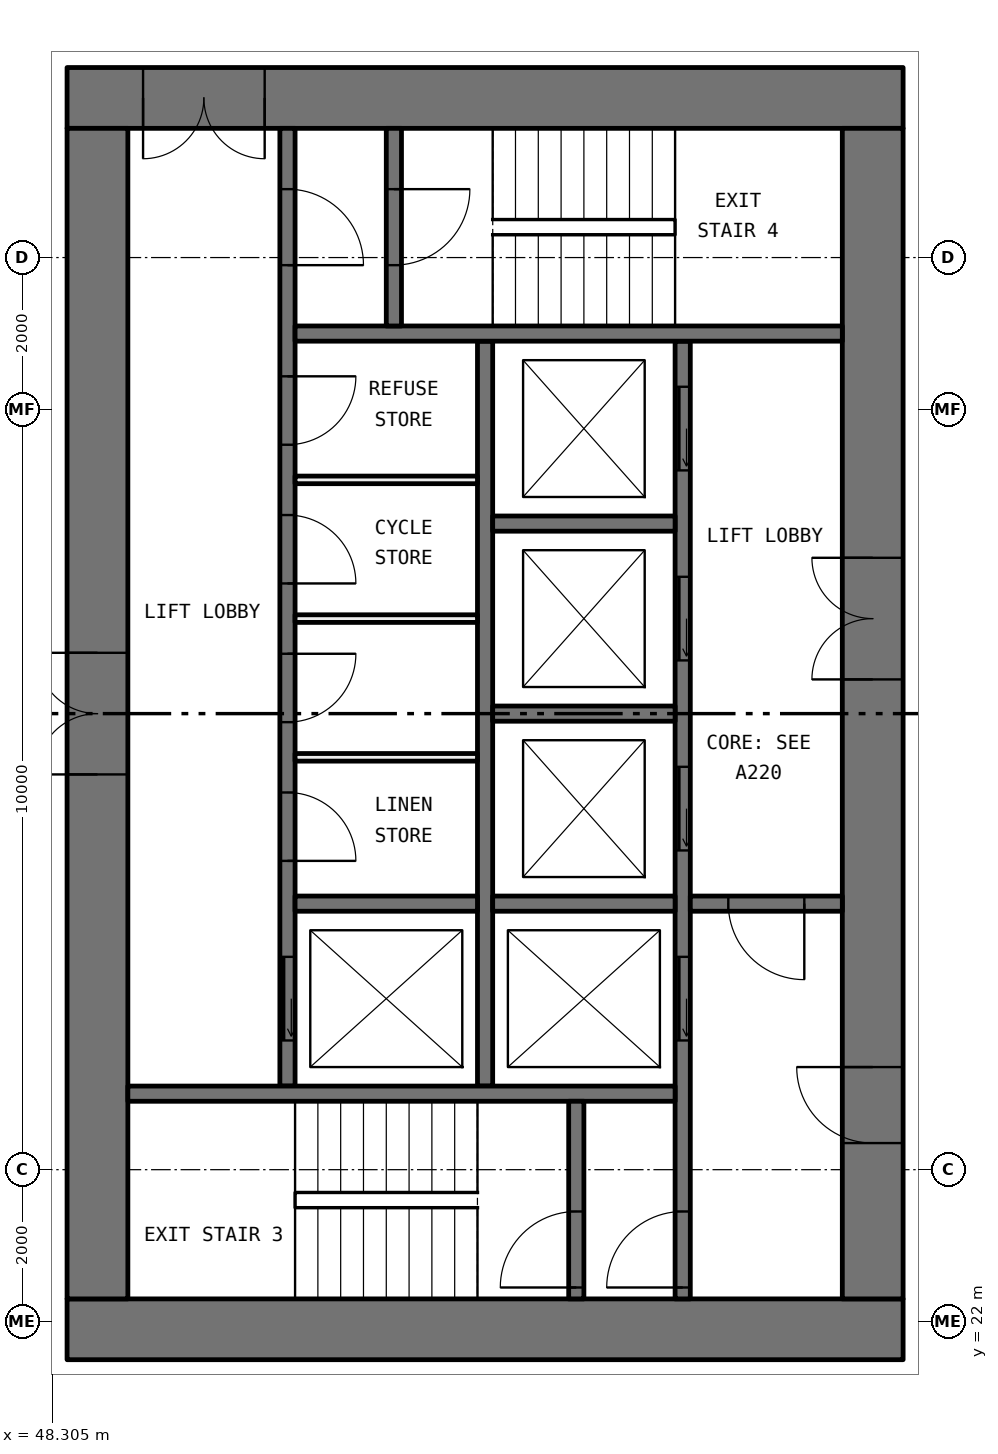
"""IFC4 building model, lengths in metres.
Left out: names, types, materials, properties, quantities, classifications, styles, units other than length and angle.
Written with IfcOpenShell. Run it as: python <this file> out.ifc"""

import sys

from ifc_helpers import new_model, si_unit, direction, frame, frame_2d, origin, place, context, subcontext, project, spatial, rectangle, extrude, element, fill, save


model = new_model("IFC4")
c1 = context("Model", 3, precision=1e-05, world=origin(), true_north=direction((0.0, 1.0)))
c2 = subcontext(c1, "Body", "Model", "MODEL_VIEW")
j1 = project(units=[si_unit("LENGTHUNIT", "METRE"), si_unit("PLANEANGLEUNIT", "RADIAN")], contexts=[c1])
p1 = place(None, origin())
s1 = spatial("IfcSite", under=j1, at=p1, CompositionType="ELEMENT")
p2 = place(p1, origin())
s2 = spatial("IfcBuilding", under=s1, at=p2, CompositionType="ELEMENT")
p3 = place(p2, frame((0.0, 0.0, 78.3)))
s3 = spatial("IfcBuildingStorey", under=s2, at=p3, CompositionType="ELEMENT", Elevation=78.3)
p4 = place(p3, frame((59.5, 21.9, 0.0), z_axis=(0.0, 0.0, 1.0), x_axis=(-1.0, 0.0, 0.0)))
e1 = element("IfcWall", 1, at=p4, inside=s3, PredefinedType="SHEAR", context=c2, shape_type="SweptSolid", body=[
    extrude(rectangle(XDim=11.0, YDim=0.8, at=frame_2d((5.5, 0.0))), origin(), (0.0, 0.0, 1.0), 3.05),
])
p5 = place(p3, frame((59.5, 38.1, 0.0), z_axis=(0.0, 0.0, 1.0), x_axis=(-1.0, 0.0, 0.0)))
e2 = element("IfcWall", 2, at=p5, inside=s3, PredefinedType="SHEAR", context=c2, shape_type="SweptSolid", body=[
    extrude(rectangle(XDim=11.0, YDim=0.8, at=frame_2d((5.5, 0.0))), origin(), (0.0, 0.0, 1.0), 3.05),
])
p6 = place(p5, frame((8.4, 0.0, 0.0)))
e3 = element("IfcOpeningElement", 3, at=p6, cuts=e2, PredefinedType="OPENING", context=c2, shape_type="SweptSolid", body=[
    extrude(rectangle(XDim=1.6, YDim=2.1, at=frame_2d((0.8, 1.05))), frame((0.0, 0.41, 0.0), z_axis=(0.0, -1.0, 0.0), x_axis=(1.0, 0.0, 0.0)), (0.0, 0.0, 1.0), 0.82),
])
p7 = place(p3, frame((59.1, 22.3, 0.0), z_axis=(0.0, 0.0, 1.0), x_axis=(0.0, 1.0, 0.0)))
e4 = element("IfcWall", 4, at=p7, inside=s3, PredefinedType="SHEAR", context=c2, shape_type="SweptSolid", body=[
    extrude(rectangle(XDim=15.4, YDim=0.8, at=frame_2d((7.7, 0.0))), origin(), (0.0, 0.0, 1.0), 3.05),
])
p8 = place(p7, frame((8.15, 0.0, 0.0)))
e5 = element("IfcOpeningElement", 5, at=p8, cuts=e4, PredefinedType="OPENING", context=c2, shape_type="SweptSolid", body=[
    extrude(rectangle(XDim=1.6, YDim=2.1, at=frame_2d((0.8, 1.05))), frame((0.0, 0.41, 0.0), z_axis=(0.0, -1.0, 0.0), x_axis=(1.0, 0.0, 0.0)), (0.0, 0.0, 1.0), 0.82),
])
p9 = place(p7, frame((2.05, 0.0, 0.0)))
e6 = element("IfcOpeningElement", 6, at=p9, cuts=e4, PredefinedType="OPENING", context=c2, shape_type="SweptSolid", body=[
    extrude(rectangle(XDim=1.0, YDim=2.1, at=frame_2d((0.5, 1.05))), frame((0.0, 0.41, 0.0), z_axis=(0.0, -1.0, 0.0), x_axis=(1.0, 0.0, 0.0)), (0.0, 0.0, 1.0), 0.82),
])
p10 = place(p3, frame((48.9, 22.3, 0.0), z_axis=(0.0, 0.0, 1.0), x_axis=(0.0, 1.0, 0.0)))
e7 = element("IfcWall", 7, at=p10, inside=s3, PredefinedType="SHEAR", context=c2, shape_type="SweptSolid", body=[
    extrude(rectangle(XDim=15.4, YDim=0.8, at=frame_2d((7.7, 0.0))), origin(), (0.0, 0.0, 1.0), 3.05),
])
p11 = place(p10, frame((6.9, 0.0, 0.0)))
e8 = element("IfcOpeningElement", 8, at=p11, cuts=e7, PredefinedType="OPENING", context=c2, shape_type="SweptSolid", body=[
    extrude(rectangle(XDim=1.6, YDim=2.1, at=frame_2d((0.8, 1.05))), frame((0.0, 0.41, 0.0), z_axis=(0.0, -1.0, 0.0), x_axis=(1.0, 0.0, 0.0)), (0.0, 0.0, 1.0), 0.82),
])
p12 = place(p3, frame((56.6, 22.3, 0.0), z_axis=(0.0, 0.0, 1.0), x_axis=(0.0, 1.0, 0.0)))
e9 = element("IfcWall", 9, at=p12, inside=s3, PredefinedType="SOLIDWALL", context=c2, shape_type="SweptSolid", body=[
    extrude(rectangle(XDim=12.6, YDim=0.2, at=frame_2d((6.3, 0.0))), origin(), (0.0, 0.0, 1.0), 3.05),
])
p13 = place(p12, frame((3.4, 0.0, 0.0)))
e10 = element("IfcOpeningElement", 10, at=p13, cuts=e9, PredefinedType="OPENING", context=c2, shape_type="SweptSolid", body=[
    extrude(rectangle(XDim=1.1, YDim=2.1, at=frame_2d((0.55, 1.05))), frame((0.0, 0.11, 0.0), z_axis=(0.0, -1.0, 0.0), x_axis=(1.0, 0.0, 0.0)), (0.0, 0.0, 1.0), 0.22),
])
p14 = place(p12, frame((5.9, 0.0, 0.0)))
e11 = element("IfcOpeningElement", 11, at=p14, cuts=e9, PredefinedType="OPENING", context=c2, shape_type="SweptSolid", body=[
    extrude(rectangle(XDim=1.1, YDim=2.1, at=frame_2d((0.55, 1.05))), frame((0.0, 0.11, 0.0), z_axis=(0.0, -1.0, 0.0), x_axis=(1.0, 0.0, 0.0)), (0.0, 0.0, 1.0), 0.22),
])
p15 = place(p12, frame((8.4, 0.0, 0.0)))
e12 = element("IfcOpeningElement", 12, at=p15, cuts=e9, PredefinedType="OPENING", context=c2, shape_type="SweptSolid", body=[
    extrude(rectangle(XDim=1.1, YDim=2.1, at=frame_2d((0.55, 1.05))), frame((0.0, 0.11, 0.0), z_axis=(0.0, -1.0, 0.0), x_axis=(1.0, 0.0, 0.0)), (0.0, 0.0, 1.0), 0.22),
])
p16 = place(p12, frame((10.9, 0.0, 0.0)))
e13 = element("IfcOpeningElement", 13, at=p16, cuts=e9, PredefinedType="OPENING", context=c2, shape_type="SweptSolid", body=[
    extrude(rectangle(XDim=1.1, YDim=2.1, at=frame_2d((0.55, 1.05))), frame((0.0, 0.11, 0.0), z_axis=(0.0, -1.0, 0.0), x_axis=(1.0, 0.0, 0.0)), (0.0, 0.0, 1.0), 0.22),
])
p17 = place(p12, frame((0.15, 0.0, 0.0)))
e14 = element("IfcOpeningElement", 14, at=p17, cuts=e9, PredefinedType="OPENING", context=c2, shape_type="SweptSolid", body=[
    extrude(rectangle(XDim=1.0, YDim=2.1, at=frame_2d((0.5, 1.05))), frame((0.0, 0.11, 0.0), z_axis=(0.0, -1.0, 0.0), x_axis=(1.0, 0.0, 0.0)), (0.0, 0.0, 1.0), 0.22),
])
p18 = place(p3, frame((51.4, 25.1, 0.0), z_axis=(0.0, 0.0, 1.0), x_axis=(0.0, 1.0, 0.0)))
e15 = element("IfcWall", 15, at=p18, inside=s3, PredefinedType="SOLIDWALL", context=c2, shape_type="SweptSolid", body=[
    extrude(rectangle(XDim=12.6, YDim=0.2, at=frame_2d((6.3, 0.0))), origin(), (0.0, 0.0, 1.0), 3.05),
])
p19 = place(p18, frame((0.6, 0.0, 0.0)))
e16 = element("IfcOpeningElement", 16, at=p19, cuts=e15, PredefinedType="OPENING", context=c2, shape_type="SweptSolid", body=[
    extrude(rectangle(XDim=1.1, YDim=2.1, at=frame_2d((0.55, 1.05))), frame((0.0, 0.11, 0.0), z_axis=(0.0, -1.0, 0.0), x_axis=(1.0, 0.0, 0.0)), (0.0, 0.0, 1.0), 0.22),
])
p20 = place(p18, frame((10.8, 0.0, 0.0)))
e17 = element("IfcOpeningElement", 17, at=p20, cuts=e15, PredefinedType="OPENING", context=c2, shape_type="SweptSolid", body=[
    extrude(rectangle(XDim=1.0, YDim=2.1, at=frame_2d((0.5, 1.05))), frame((0.0, 0.11, 0.0), z_axis=(0.0, -1.0, 0.0), x_axis=(1.0, 0.0, 0.0)), (0.0, 0.0, 1.0), 0.22),
])
p21 = place(p18, frame((2.962, 0.0, 0.0)))
e18 = element("IfcOpeningElement", 18, at=p21, cuts=e15, PredefinedType="OPENING", context=c2, shape_type="SweptSolid", body=[
    extrude(rectangle(XDim=0.9, YDim=2.1, at=frame_2d((0.45, 1.05))), frame((0.0, 0.11, 0.0), z_axis=(0.0, -1.0, 0.0), x_axis=(1.0, 0.0, 0.0)), (0.0, 0.0, 1.0), 0.22),
])
p22 = place(p18, frame((4.788, 0.0, 0.0)))
e19 = element("IfcOpeningElement", 19, at=p22, cuts=e15, PredefinedType="OPENING", context=c2, shape_type="SweptSolid", body=[
    extrude(rectangle(XDim=0.9, YDim=2.1, at=frame_2d((0.45, 1.05))), frame((0.0, 0.11, 0.0), z_axis=(0.0, -1.0, 0.0), x_axis=(1.0, 0.0, 0.0)), (0.0, 0.0, 1.0), 0.22),
])
p23 = place(p18, frame((6.613, 0.0, 0.0)))
e20 = element("IfcOpeningElement", 20, at=p23, cuts=e15, PredefinedType="OPENING", context=c2, shape_type="SweptSolid", body=[
    extrude(rectangle(XDim=0.9, YDim=2.1, at=frame_2d((0.45, 1.05))), frame((0.0, 0.11, 0.0), z_axis=(0.0, -1.0, 0.0), x_axis=(1.0, 0.0, 0.0)), (0.0, 0.0, 1.0), 0.22),
])
p24 = place(p18, frame((8.438, 0.0, 0.0)))
e21 = element("IfcOpeningElement", 21, at=p24, cuts=e15, PredefinedType="OPENING", context=c2, shape_type="SweptSolid", body=[
    extrude(rectangle(XDim=0.9, YDim=2.1, at=frame_2d((0.45, 1.05))), frame((0.0, 0.11, 0.0), z_axis=(0.0, -1.0, 0.0), x_axis=(1.0, 0.0, 0.0)), (0.0, 0.0, 1.0), 0.22),
])
p25 = place(p3, frame((54.0, 25.1, 0.0), z_axis=(0.0, 0.0, 1.0), x_axis=(0.0, 1.0, 0.0)))
e22 = element("IfcWall", 22, at=p25, inside=s3, PredefinedType="SOLIDWALL", context=c2, shape_type="SweptSolid", body=[
    extrude(rectangle(XDim=9.8, YDim=0.2, at=frame_2d((4.9, 0.0))), origin(), (0.0, 0.0, 1.0), 3.05),
])
for number, where, z_axis, x_axis in (
    (23, (56.5, 25.0, 0.0), (0.0, 0.0, 1.0), (-1.0, 0.0, 0.0)),
    (24, (58.7, 35.0, 0.0), (0.0, 0.0, 1.0), (-1.0, 0.0, 0.0)),
):
    element("IfcWall", number, at=place(p3, frame(where, z_axis=z_axis, x_axis=x_axis)), inside=s3, PredefinedType="SOLIDWALL", context=c2, shape_type="SweptSolid", body=[
        extrude(rectangle(XDim=7.2, YDim=0.2, at=frame_2d((3.6, 0.0))), origin(), (0.0, 0.0, 1.0), 3.05),
    ])
p26 = place(p3, frame((58.7, 27.5, 0.0), z_axis=(0.0, 0.0, 1.0), x_axis=(-1.0, 0.0, 0.0)))
e25 = element("IfcWall", 25, at=p26, inside=s3, PredefinedType="SOLIDWALL", context=c2, shape_type="SweptSolid", body=[
    extrude(rectangle(XDim=2.0, YDim=0.2, at=frame_2d((1.0, 0.0))), origin(), (0.0, 0.0, 1.0), 3.05),
])
p27 = place(p26, frame((0.5, 0.0, 0.0)))
e26 = element("IfcOpeningElement", 26, at=p27, cuts=e25, PredefinedType="OPENING", context=c2, shape_type="SweptSolid", body=[
    extrude(rectangle(XDim=1.0, YDim=2.1, at=frame_2d((0.5, 1.05))), frame((0.0, 0.11, 0.0), z_axis=(0.0, -1.0, 0.0), x_axis=(1.0, 0.0, 0.0)), (0.0, 0.0, 1.0), 0.22),
])
p28 = place(p3, frame((55.2, 22.3, 0.0), z_axis=(0.0, 0.0, 1.0), x_axis=(0.0, 1.0, 0.0)))
e27 = element("IfcWall", 27, at=p28, inside=s3, PredefinedType="SOLIDWALL", context=c2, shape_type="SweptSolid", body=[
    extrude(rectangle(XDim=2.6, YDim=0.2, at=frame_2d((1.3, 0.0))), origin(), (0.0, 0.0, 1.0), 3.05),
])
p29 = place(p28, frame((0.15, 0.0, 0.0)))
e28 = element("IfcOpeningElement", 28, at=p29, cuts=e27, PredefinedType="OPENING", context=c2, shape_type="SweptSolid", body=[
    extrude(rectangle(XDim=1.0, YDim=2.1, at=frame_2d((0.5, 1.05))), frame((0.0, 0.11, 0.0), z_axis=(0.0, -1.0, 0.0), x_axis=(1.0, 0.0, 0.0)), (0.0, 0.0, 1.0), 0.22),
])
p30 = place(p3, frame((52.8, 35.1, 0.0), z_axis=(0.0, 0.0, 1.0), x_axis=(0.0, 1.0, 0.0)))
e29 = element("IfcWall", 29, at=p30, inside=s3, PredefinedType="SOLIDWALL", context=c2, shape_type="SweptSolid", body=[
    extrude(rectangle(XDim=2.6, YDim=0.2, at=frame_2d((1.3, 0.0))), origin(), (0.0, 0.0, 1.0), 3.05),
])
p31 = place(p30, frame((0.8, 0.0, 0.0)))
e30 = element("IfcOpeningElement", 30, at=p31, cuts=e29, PredefinedType="OPENING", context=c2, shape_type="SweptSolid", body=[
    extrude(rectangle(XDim=1.0, YDim=2.1, at=frame_2d((0.5, 1.05))), frame((0.0, 0.11, 0.0), z_axis=(0.0, -1.0, 0.0), x_axis=(1.0, 0.0, 0.0)), (0.0, 0.0, 1.0), 0.22),
])
for number, where, z_axis, x_axis in (
    (31, (56.5, 27.5, 0.0), (0.0, 0.0, 1.0), (-1.0, 0.0, 0.0)),
    (32, (56.5, 30.0, 0.0), (0.0, 0.0, 1.0), (-1.0, 0.0, 0.0)),
    (33, (56.5, 32.5, 0.0), (0.0, 0.0, 1.0), (-1.0, 0.0, 0.0)),
    (34, (53.9, 27.5, 0.0), (0.0, 0.0, 1.0), (-1.0, 0.0, 0.0)),
):
    element("IfcWall", number, at=place(p3, frame(where, z_axis=z_axis, x_axis=x_axis)), inside=s3, PredefinedType="SOLIDWALL", context=c2, shape_type="SweptSolid", body=[
        extrude(rectangle(XDim=2.4, YDim=0.2, at=frame_2d((1.2, 0.0))), origin(), (0.0, 0.0, 1.0), 3.05),
    ])
for number, where, z_axis, x_axis in (
    (35, (53.9, 29.425, 0.0), (0.0, 0.0, 1.0), (-1.0, 0.0, 0.0)),
    (36, (53.9, 31.25, 0.0), (0.0, 0.0, 1.0), (-1.0, 0.0, 0.0)),
    (37, (53.9, 33.075, 0.0), (0.0, 0.0, 1.0), (-1.0, 0.0, 0.0)),
):
    element("IfcWall", number, at=place(p3, frame(where, z_axis=z_axis, x_axis=x_axis)), inside=s3, PredefinedType="PARTITIONING", context=c2, shape_type="SweptSolid", body=[
        extrude(rectangle(XDim=2.4, YDim=0.1, at=frame_2d((1.2, 0.0))), origin(), (0.0, 0.0, 1.0), 3.05),
    ])
p32 = place(p19, origin())
e38 = element("IfcDoor", 38, at=p32, inside=s3, OperationType="SLIDING_TO_LEFT", PredefinedType="DOOR", context=c2, shape_type="SweptSolid", body=[
    extrude(rectangle(XDim=1.1, YDim=2.1, at=frame_2d((0.55, 1.05))), frame((0.0, 0.025, 0.0), z_axis=(0.0, -1.0, 0.0), x_axis=(1.0, 0.0, 0.0)), (0.0, 0.0, 1.0), 0.05),
])
fill(e16, e38)
p33 = place(p13, origin())
e39 = element("IfcDoor", 39, at=p33, inside=s3, OperationType="SLIDING_TO_LEFT", PredefinedType="DOOR", context=c2, shape_type="SweptSolid", body=[
    extrude(rectangle(XDim=1.1, YDim=2.1, at=frame_2d((0.55, 1.05))), frame((0.0, 0.025, 0.0), z_axis=(0.0, -1.0, 0.0), x_axis=(1.0, 0.0, 0.0)), (0.0, 0.0, 1.0), 0.05),
])
fill(e10, e39)
p34 = place(p14, origin())
e40 = element("IfcDoor", 40, at=p34, inside=s3, OperationType="SLIDING_TO_LEFT", PredefinedType="DOOR", context=c2, shape_type="SweptSolid", body=[
    extrude(rectangle(XDim=1.1, YDim=2.1, at=frame_2d((0.55, 1.05))), frame((0.0, 0.025, 0.0), z_axis=(0.0, -1.0, 0.0), x_axis=(1.0, 0.0, 0.0)), (0.0, 0.0, 1.0), 0.05),
])
fill(e11, e40)
p35 = place(p15, origin())
e41 = element("IfcDoor", 41, at=p35, inside=s3, OperationType="SLIDING_TO_LEFT", PredefinedType="DOOR", context=c2, shape_type="SweptSolid", body=[
    extrude(rectangle(XDim=1.1, YDim=2.1, at=frame_2d((0.55, 1.05))), frame((0.0, 0.025, 0.0), z_axis=(0.0, -1.0, 0.0), x_axis=(1.0, 0.0, 0.0)), (0.0, 0.0, 1.0), 0.05),
])
fill(e12, e41)
p36 = place(p16, origin())
e42 = element("IfcDoor", 42, at=p36, inside=s3, OperationType="SLIDING_TO_LEFT", PredefinedType="DOOR", context=c2, shape_type="SweptSolid", body=[
    extrude(rectangle(XDim=1.1, YDim=2.1, at=frame_2d((0.55, 1.05))), frame((0.0, 0.025, 0.0), z_axis=(0.0, -1.0, 0.0), x_axis=(1.0, 0.0, 0.0)), (0.0, 0.0, 1.0), 0.05),
])
fill(e13, e42)
p37 = place(p29, origin())
e43 = element("IfcDoor", 43, at=p37, inside=s3, OperationType="SINGLE_SWING_RIGHT", PredefinedType="DOOR", context=c2, shape_type="SweptSolid", body=[
    extrude(rectangle(XDim=1.0, YDim=2.1, at=frame_2d((0.5, 1.05))), frame((0.0, 0.025, 0.0), z_axis=(0.0, -1.0, 0.0), x_axis=(1.0, 0.0, 0.0)), (0.0, 0.0, 1.0), 0.05),
])
fill(e28, e43)
p38 = place(p17, origin())
e44 = element("IfcDoor", 44, at=p38, inside=s3, OperationType="SINGLE_SWING_RIGHT", PredefinedType="DOOR", context=c2, shape_type="SweptSolid", body=[
    extrude(rectangle(XDim=1.0, YDim=2.1, at=frame_2d((0.5, 1.05))), frame((0.0, 0.025, 0.0), z_axis=(0.0, -1.0, 0.0), x_axis=(1.0, 0.0, 0.0)), (0.0, 0.0, 1.0), 0.05),
])
fill(e14, e44)
p39 = place(p20, frame((1.0, 0.0, 0.0), x_axis=(-1.0, 0.0, 0.0)))
e45 = element("IfcDoor", 45, at=p39, inside=s3, OperationType="SINGLE_SWING_LEFT", PredefinedType="DOOR", context=c2, shape_type="SweptSolid", body=[
    extrude(rectangle(XDim=1.0, YDim=2.1, at=frame_2d((0.5, 1.05))), frame((0.0, 0.025, 0.0), z_axis=(0.0, -1.0, 0.0), x_axis=(1.0, 0.0, 0.0)), (0.0, 0.0, 1.0), 0.05),
])
fill(e17, e45)
p40 = place(p31, frame((1.0, 0.0, 0.0), x_axis=(-1.0, 0.0, 0.0)))
e46 = element("IfcDoor", 46, at=p40, inside=s3, OperationType="SINGLE_SWING_RIGHT", PredefinedType="DOOR", context=c2, shape_type="SweptSolid", body=[
    extrude(rectangle(XDim=1.0, YDim=2.1, at=frame_2d((0.5, 1.05))), frame((0.0, 0.025, 0.0), z_axis=(0.0, -1.0, 0.0), x_axis=(1.0, 0.0, 0.0)), (0.0, 0.0, 1.0), 0.05),
])
fill(e30, e46)
p41 = place(p27, origin())
e47 = element("IfcDoor", 47, at=p41, inside=s3, OperationType="SINGLE_SWING_RIGHT", PredefinedType="DOOR", context=c2, shape_type="SweptSolid", body=[
    extrude(rectangle(XDim=1.0, YDim=2.1, at=frame_2d((0.5, 1.05))), frame((0.0, 0.025, 0.0), z_axis=(0.0, -1.0, 0.0), x_axis=(1.0, 0.0, 0.0)), (0.0, 0.0, 1.0), 0.05),
])
fill(e26, e47)
p42 = place(p8, origin())
e48 = element("IfcDoor", 48, at=p42, inside=s3, OperationType="DOUBLE_DOOR_SINGLE_SWING", PredefinedType="DOOR", context=c2, shape_type="SweptSolid", body=[
    extrude(rectangle(XDim=1.6, YDim=2.1, at=frame_2d((0.8, 1.05))), frame((0.0, 0.025, 0.0), z_axis=(0.0, -1.0, 0.0), x_axis=(1.0, 0.0, 0.0)), (0.0, 0.0, 1.0), 0.05),
])
fill(e5, e48)
p43 = place(p9, origin())
e49 = element("IfcDoor", 49, at=p43, inside=s3, OperationType="SINGLE_SWING_LEFT", PredefinedType="DOOR", context=c2, shape_type="SweptSolid", body=[
    extrude(rectangle(XDim=1.0, YDim=2.1, at=frame_2d((0.5, 1.05))), frame((0.0, 0.025, 0.0), z_axis=(0.0, -1.0, 0.0), x_axis=(1.0, 0.0, 0.0)), (0.0, 0.0, 1.0), 0.05),
])
fill(e6, e49)
p44 = place(p6, origin())
e50 = element("IfcDoor", 50, at=p44, inside=s3, OperationType="DOUBLE_DOOR_SINGLE_SWING", PredefinedType="DOOR", context=c2, shape_type="SweptSolid", body=[
    extrude(rectangle(XDim=1.6, YDim=2.1, at=frame_2d((0.8, 1.05))), frame((0.0, 0.025, 0.0), z_axis=(0.0, -1.0, 0.0), x_axis=(1.0, 0.0, 0.0)), (0.0, 0.0, 1.0), 0.05),
])
fill(e3, e50)
p45 = place(p11, origin())
e51 = element("IfcDoor", 51, at=p45, inside=s3, OperationType="DOUBLE_DOOR_SINGLE_SWING", PredefinedType="DOOR", context=c2, shape_type="SweptSolid", body=[
    extrude(rectangle(XDim=1.6, YDim=2.1, at=frame_2d((0.8, 1.05))), frame((0.0, 0.025, 0.0), z_axis=(0.0, -1.0, 0.0), x_axis=(1.0, 0.0, 0.0)), (0.0, 0.0, 1.0), 0.05),
])
fill(e8, e51)
p46 = place(p21, frame((0.9, 0.0, 0.0), x_axis=(-1.0, 0.0, 0.0)))
e52 = element("IfcDoor", 52, at=p46, inside=s3, OperationType="SINGLE_SWING_LEFT", PredefinedType="DOOR", context=c2, shape_type="SweptSolid", body=[
    extrude(rectangle(XDim=0.9, YDim=2.1, at=frame_2d((0.45, 1.05))), frame((0.0, 0.025, 0.0), z_axis=(0.0, -1.0, 0.0), x_axis=(1.0, 0.0, 0.0)), (0.0, 0.0, 1.0), 0.05),
])
fill(e18, e52)
p47 = place(p22, frame((0.9, 0.0, 0.0), x_axis=(-1.0, 0.0, 0.0)))
e53 = element("IfcDoor", 53, at=p47, inside=s3, OperationType="SINGLE_SWING_RIGHT", PredefinedType="DOOR", context=c2, shape_type="SweptSolid", body=[
    extrude(rectangle(XDim=0.9, YDim=2.1, at=frame_2d((0.45, 1.05))), frame((0.0, 0.025, 0.0), z_axis=(0.0, -1.0, 0.0), x_axis=(1.0, 0.0, 0.0)), (0.0, 0.0, 1.0), 0.05),
])
fill(e19, e53)
p48 = place(p23, frame((0.9, 0.0, 0.0), x_axis=(-1.0, 0.0, 0.0)))
e54 = element("IfcDoor", 54, at=p48, inside=s3, OperationType="SINGLE_SWING_LEFT", PredefinedType="DOOR", context=c2, shape_type="SweptSolid", body=[
    extrude(rectangle(XDim=0.9, YDim=2.1, at=frame_2d((0.45, 1.05))), frame((0.0, 0.025, 0.0), z_axis=(0.0, -1.0, 0.0), x_axis=(1.0, 0.0, 0.0)), (0.0, 0.0, 1.0), 0.05),
])
fill(e20, e54)
p49 = place(p24, frame((0.9, 0.0, 0.0), x_axis=(-1.0, 0.0, 0.0)))
e55 = element("IfcDoor", 55, at=p49, inside=s3, OperationType="SINGLE_SWING_RIGHT", PredefinedType="DOOR", context=c2, shape_type="SweptSolid", body=[
    extrude(rectangle(XDim=0.9, YDim=2.1, at=frame_2d((0.45, 1.05))), frame((0.0, 0.025, 0.0), z_axis=(0.0, -1.0, 0.0), x_axis=(1.0, 0.0, 0.0)), (0.0, 0.0, 1.0), 0.05),
])
fill(e21, e55)
save(model, sys.argv[1])
